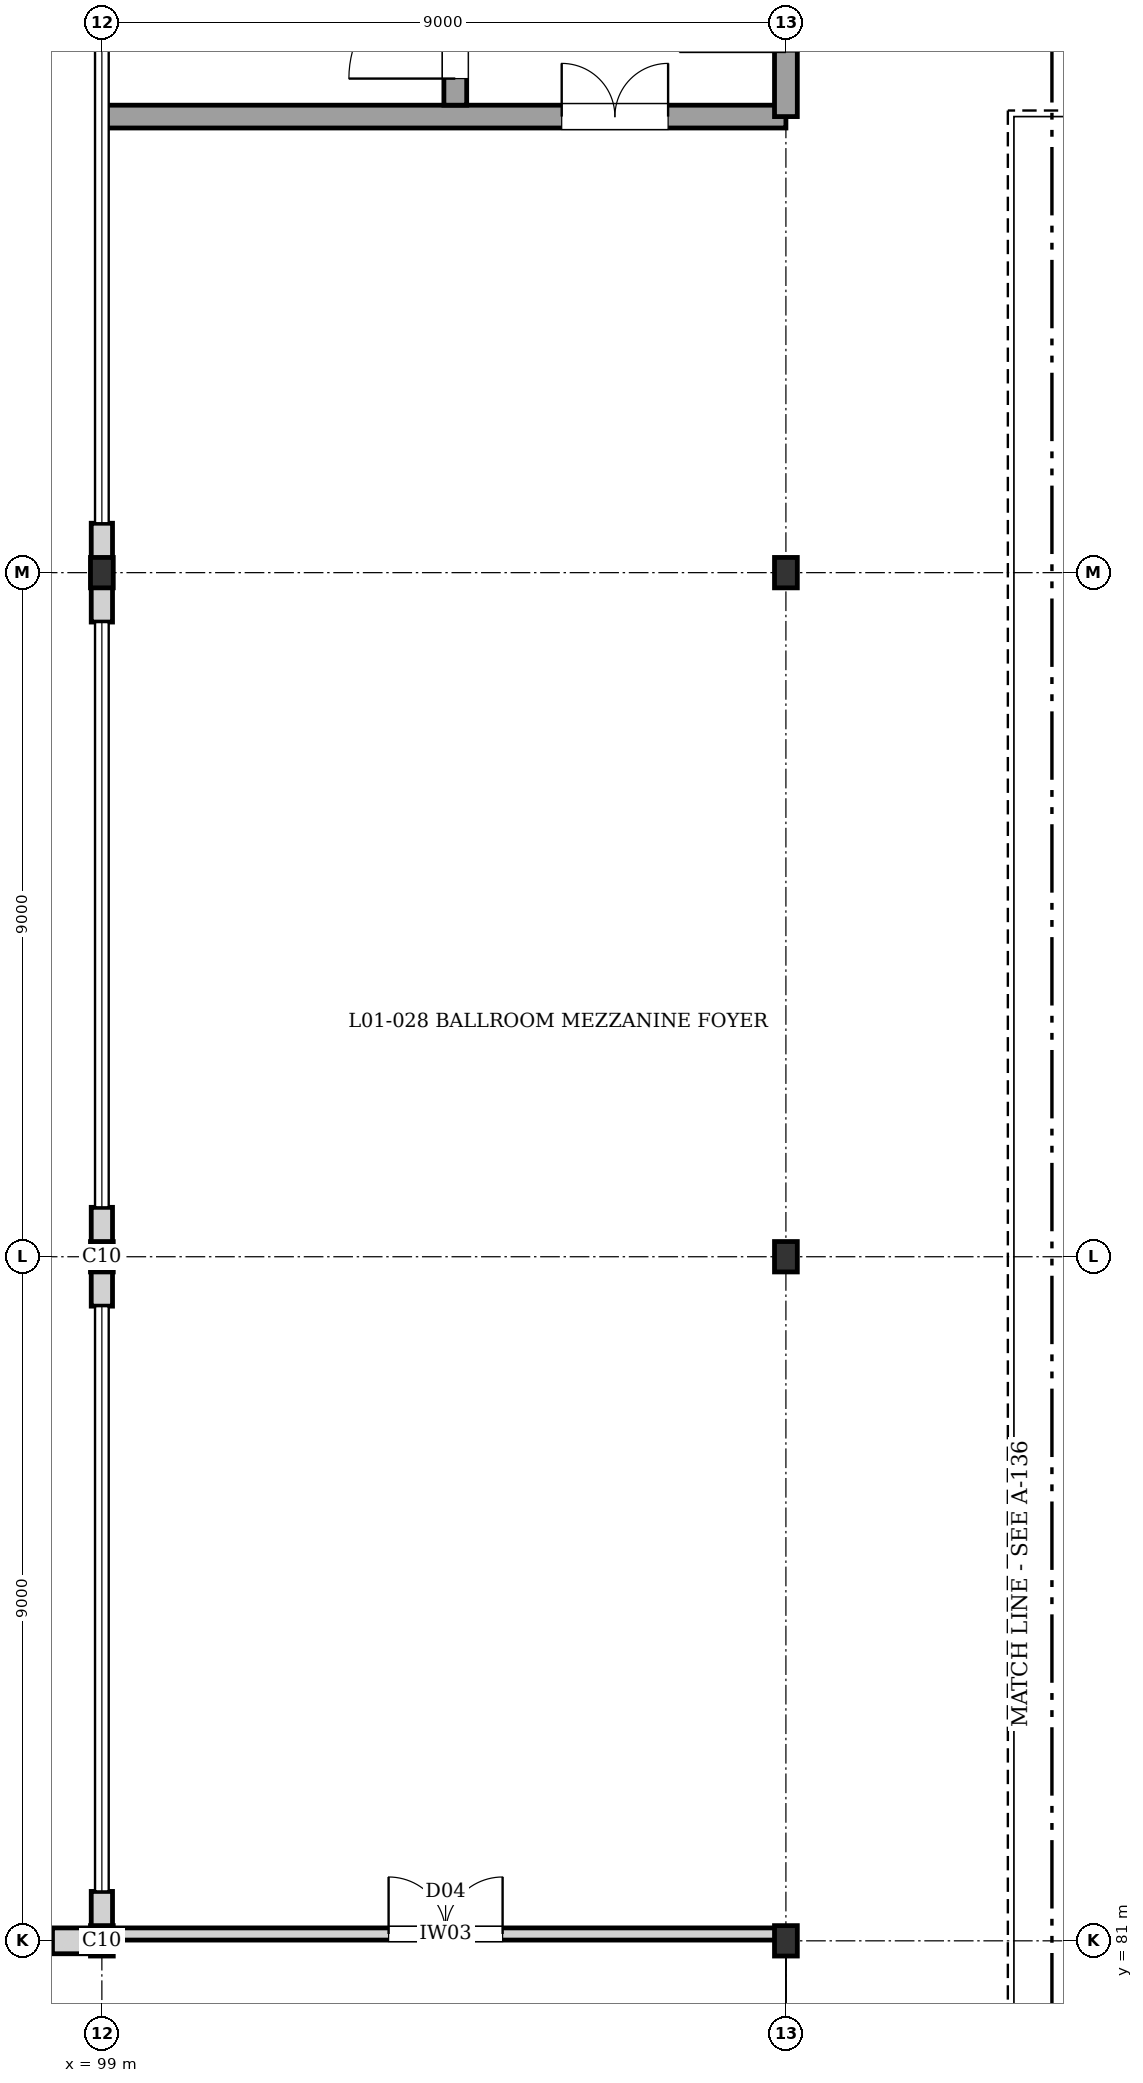
"""IFC4 building model, lengths in metres.
Left out: names, types, materials, properties, quantities, classifications, styles, units other than length and angle.
Written with IfcOpenShell. Run it as: python <this file> out.ifc"""

import sys

from ifc_helpers import new_model, si_unit, direction, frame, frame_2d, origin, origin_2d, place, context, subcontext, project, spatial, rectangle, i_section, extrude, element, fill, save


model = new_model("IFC4")
c1 = context("Model", 3, precision=1e-05, world=origin(), true_north=direction((0.0, 1.0)))
c2 = subcontext(c1, "Body", "Model", "MODEL_VIEW")
j1 = project(units=[si_unit("LENGTHUNIT", "METRE"), si_unit("PLANEANGLEUNIT", "RADIAN")], contexts=[c1])
p1 = place(None, origin())
s1 = spatial("IfcSite", under=j1, at=p1, CompositionType="ELEMENT")
p2 = place(p1, origin())
s2 = spatial("IfcBuilding", under=s1, at=p2, CompositionType="ELEMENT")
p3 = place(p2, frame((0.0, 0.0, 4.32)))
s3 = spatial("IfcBuildingStorey", under=s2, at=p3, CompositionType="ELEMENT", Elevation=4.32)
for number, where, z_axis, x_axis in (
    (1, (99.0, 81.0, 0.0), (0.0, 0.0, 1.0), (1.0, 0.0, 0.0)),
    (2, (99.0, 90.0, 0.0), (0.0, 0.0, 1.0), (1.0, 0.0, 0.0)),
    (3, (99.0, 99.0, 0.0), (0.0, 0.0, 1.0), (1.0, 0.0, 0.0)),
    (4, (108.0, 81.0, 0.0), (0.0, 0.0, 1.0), (1.0, 0.0, 0.0)),
    (5, (108.0, 90.0, 0.0), (0.0, 0.0, 1.0), (1.0, 0.0, 0.0)),
    (6, (108.0, 99.0, 0.0), (0.0, 0.0, 1.0), (1.0, 0.0, 0.0)),
):
    element("IfcColumn", number, at=place(p3, frame(where, z_axis=z_axis, x_axis=x_axis)), inside=s3, PredefinedType="COLUMN", context=c2, shape_type="SweptSolid", body=[
        extrude(i_section(OverallWidth=0.3, OverallDepth=0.4, WebThickness=0.013, FlangeThickness=0.024, at=origin_2d()), origin(), (0.0, 0.0, 1.0), 3.84),
    ])
p4 = place(p3, frame((98.35, 81.0, 0.0), z_axis=(0.0, 0.0, 1.0), x_axis=(1.0, 0.0, 0.0)))
e7 = element("IfcWall", 7, at=p4, inside=s3, PredefinedType="SOLIDWALL", context=c2, shape_type="SweptSolid", body=[
    extrude(rectangle(XDim=0.65, YDim=0.34, at=frame_2d((0.325, 0.0))), origin(), (0.0, 0.0, 1.0), 3.28),
])
p5 = place(p3, frame((99.0, 81.155, 0.0), z_axis=(0.0, 0.0, 1.0), x_axis=(0.0, 1.0, 0.0)))
e8 = element("IfcWall", 8, at=p5, inside=s3, PredefinedType="SOLIDWALL", context=c2, shape_type="SweptSolid", body=[
    extrude(rectangle(XDim=0.495, YDim=0.28, at=frame_2d((0.248, 0.0))), origin(), (0.0, 0.0, 1.0), 3.6),
])
p6 = place(p3, frame((99.0, 89.35, 0.0), z_axis=(0.0, 0.0, 1.0), x_axis=(0.0, 1.0, 0.0)))
e9 = element("IfcWall", 9, at=p6, inside=s3, PredefinedType="SOLIDWALL", context=c2, shape_type="SweptSolid", body=[
    extrude(rectangle(XDim=0.65, YDim=0.28, at=frame_2d((0.325, 0.0))), origin(), (0.0, 0.0, 1.0), 3.28),
])
for number, where, z_axis, x_axis in (
    (10, (99.0, 90.0, 0.0), (0.0, 0.0, 1.0), (0.0, 1.0, 0.0)),
    (11, (99.0, 98.35, 0.0), (0.0, 0.0, 1.0), (0.0, 1.0, 0.0)),
):
    element("IfcWall", number, at=place(p3, frame(where, z_axis=z_axis, x_axis=x_axis)), inside=s3, PredefinedType="SOLIDWALL", context=c2, shape_type="SweptSolid", body=[
        extrude(rectangle(XDim=0.65, YDim=0.28, at=frame_2d((0.325, 0.0))), origin(), (0.0, 0.0, 1.0), 3.22),
    ])
p7 = place(p3, frame((99.0, 99.0, 0.0), z_axis=(0.0, 0.0, 1.0), x_axis=(0.0, 1.0, 0.0)))
e12 = element("IfcWall", 12, at=p7, inside=s3, PredefinedType="SOLIDWALL", context=c2, shape_type="SweptSolid", body=[
    extrude(rectangle(XDim=0.65, YDim=0.28, at=frame_2d((0.325, 0.0))), origin(), (0.0, 0.0, 1.0), 3.18),
])
p8 = place(p3, frame((99.0, 105.0, 0.0), z_axis=(0.0, 0.0, 1.0), x_axis=(1.0, 0.0, 0.0)))
e13 = element("IfcWall", 13, at=p8, inside=s3, PredefinedType="SHEAR", context=c2, shape_type="SweptSolid", body=[
    extrude(rectangle(XDim=9.0, YDim=0.3, at=frame_2d((4.5, 0.0))), origin(), (0.0, 0.0, 1.0), 3.6),
])
p9 = place(p8, frame((6.05, 0.0, 0.0)))
e14 = element("IfcOpeningElement", 14, at=p9, cuts=e13, PredefinedType="OPENING", context=c2, shape_type="SweptSolid", body=[
    extrude(rectangle(XDim=1.4, YDim=2.02, at=frame_2d((0.7, 1.01))), frame((0.0, 0.16, 0.0), z_axis=(0.0, -1.0, 0.0), x_axis=(1.0, 0.0, 0.0)), (0.0, 0.0, 1.0), 0.32),
])
p10 = place(p3, frame((108.0, 105.0, 0.0), z_axis=(0.0, 0.0, 1.0), x_axis=(0.0, 1.0, 0.0)))
e15 = element("IfcWall", 15, at=p10, inside=s3, PredefinedType="SHEAR", context=c2, shape_type="SweptSolid", body=[
    extrude(rectangle(XDim=9.0, YDim=0.3, at=frame_2d((4.5, 0.0))), origin(), (0.0, 0.0, 1.0), 3.6),
])
p11 = place(p10, frame((0.85, 0.0, 0.0)))
e16 = element("IfcOpeningElement", 16, at=p11, cuts=e15, PredefinedType="OPENING", context=c2, shape_type="SweptSolid", body=[
    extrude(rectangle(XDim=1.4, YDim=2.02, at=frame_2d((0.7, 1.01))), frame((0.0, 0.16, 0.0), z_axis=(0.0, -1.0, 0.0), x_axis=(1.0, 0.0, 0.0)), (0.0, 0.0, 1.0), 0.32),
])
p12 = place(p3, frame((103.65, 105.15, 0.0), z_axis=(0.0, 0.0, 1.0), x_axis=(0.0, 1.0, 0.0)))
e17 = element("IfcWall", 17, at=p12, inside=s3, PredefinedType="SHEAR", context=c2, shape_type="SweptSolid", body=[
    extrude(rectangle(XDim=8.7, YDim=0.3, at=frame_2d((4.35, 0.0))), origin(), (0.0, 0.0, 1.0), 3.6),
])
p13 = place(p12, frame((0.35, 0.0, 0.0)))
e18 = element("IfcOpeningElement", 18, at=p13, cuts=e17, PredefinedType="OPENING", context=c2, shape_type="SweptSolid", body=[
    extrude(rectangle(XDim=1.4, YDim=2.02, at=frame_2d((0.7, 1.01))), frame((0.0, 0.16, 0.0), z_axis=(0.0, -1.0, 0.0), x_axis=(1.0, 0.0, 0.0)), (0.0, 0.0, 1.0), 0.32),
])
p14 = place(p3, frame((99.145, 81.09, 0.0), z_axis=(0.0, 0.0, 1.0), x_axis=(1.0, 0.0, 0.0)))
e19 = element("IfcWall", 19, at=p14, inside=s3, PredefinedType="PARTITIONING", context=c2, shape_type="SweptSolid", body=[
    extrude(rectangle(XDim=8.755, YDim=0.16, at=frame_2d((4.377, 0.0))), origin(), (0.0, 0.0, 1.0), 3.22),
])
p15 = place(p14, frame((3.627, 0.0, 0.0)))
e20 = element("IfcOpeningElement", 20, at=p15, cuts=e19, PredefinedType="OPENING", context=c2, shape_type="SweptSolid", body=[
    extrude(rectangle(XDim=1.5, YDim=2.1, at=frame_2d((0.75, 1.05))), frame((0.0, 0.09, 0.0), z_axis=(0.0, -1.0, 0.0), x_axis=(1.0, 0.0, 0.0)), (0.0, 0.0, 1.0), 0.18),
])
p16 = place(p9, origin())
e21 = element("IfcDoor", 21, at=p16, inside=s3, OperationType="DOUBLE_DOOR_SINGLE_SWING", PredefinedType="DOOR", context=c2, shape_type="SweptSolid", body=[
    extrude(rectangle(XDim=1.4, YDim=2.02, at=frame_2d((0.7, 1.01))), frame((0.0, 0.025, 0.0), z_axis=(0.0, -1.0, 0.0), x_axis=(1.0, 0.0, 0.0)), (0.0, 0.0, 1.0), 0.05),
])
fill(e14, e21)
p17 = place(p13, origin())
e22 = element("IfcDoor", 22, at=p17, inside=s3, OperationType="SINGLE_SWING_LEFT", PredefinedType="DOOR", context=c2, shape_type="SweptSolid", body=[
    extrude(rectangle(XDim=1.4, YDim=2.02, at=frame_2d((0.7, 1.01))), frame((0.0, 0.025, 0.0), z_axis=(0.0, -1.0, 0.0), x_axis=(1.0, 0.0, 0.0)), (0.0, 0.0, 1.0), 0.05),
])
fill(e18, e22)
p18 = place(p15, origin())
e23 = element("IfcDoor", 23, at=p18, inside=s3, OperationType="DOUBLE_DOOR_SINGLE_SWING", PredefinedType="DOOR", context=c2, shape_type="SweptSolid", body=[
    extrude(rectangle(XDim=1.5, YDim=2.1, at=frame_2d((0.75, 1.05))), frame((0.0, 0.025, 0.0), z_axis=(0.0, -1.0, 0.0), x_axis=(1.0, 0.0, 0.0)), (0.0, 0.0, 1.0), 0.05),
])
fill(e20, e23)
save(model, sys.argv[1])
